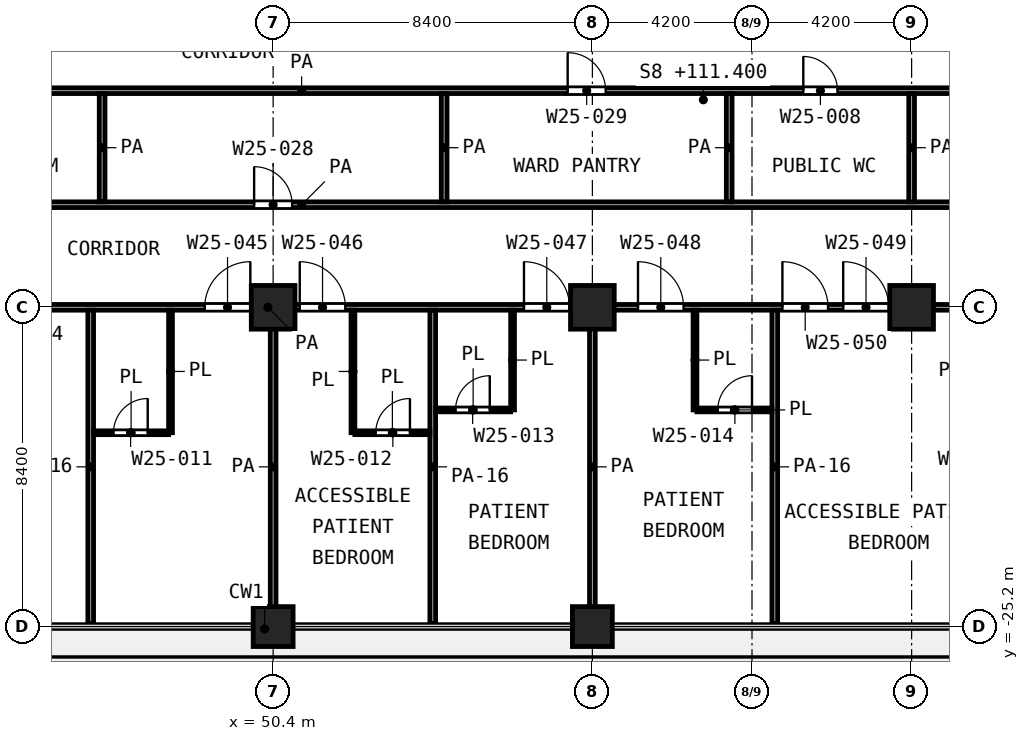
"""IFC4 building model, lengths in metres.
Left out: names, types, materials, properties, quantities, classifications, styles, units other than length and angle.
Written with IfcOpenShell. Run it as: python <this file> out.ifc"""

import sys

from ifc_helpers import new_model, si_unit, direction, frame, frame_2d, origin, origin_2d, place, context, subcontext, project, spatial, rectangle, extrude, element, fill, save


model = new_model("IFC4")
c1 = context("Model", 3, precision=1e-05, world=origin(), true_north=direction((0.0, 1.0)))
c2 = subcontext(c1, "Body", "Model", "MODEL_VIEW")
j1 = project(units=[si_unit("LENGTHUNIT", "METRE"), si_unit("PLANEANGLEUNIT", "RADIAN")], contexts=[c1])
p1 = place(None, origin())
s1 = spatial("IfcSite", under=j1, at=p1, CompositionType="ELEMENT")
p2 = place(p1, origin())
s2 = spatial("IfcBuilding", under=s1, at=p2, CompositionType="ELEMENT")
p3 = place(p2, frame((0.0, 0.0, 111.4)))
s3 = spatial("IfcBuildingStorey", under=s2, at=p3, CompositionType="ELEMENT", Elevation=111.4)
for number, where, z_axis, x_axis in (
    (1, (50.4, -16.8, 0.0), (0.0, 0.0, 1.0), (1.0, 0.0, 0.0)),
    (2, (58.8, -16.8, 0.0), (0.0, 0.0, 1.0), (1.0, 0.0, 0.0)),
    (3, (67.2, -16.8, 0.0), (0.0, 0.0, 1.0), (1.0, 0.0, 0.0)),
):
    element("IfcColumn", number, at=place(p3, frame(where, z_axis=z_axis, x_axis=x_axis)), inside=s3, PredefinedType="COLUMN", context=c2, shape_type="SweptSolid", body=[
        extrude(rectangle(XDim=1.15, YDim=1.15, at=origin_2d()), origin(), (0.0, 0.0, 1.0), 4.2),
    ])
for number, where, z_axis, x_axis in (
    (4, (50.4, -25.2, 0.0), (0.0, 0.0, 1.0), (1.0, 0.0, 0.0)),
    (5, (58.8, -25.2, 0.0), (0.0, 0.0, 1.0), (1.0, 0.0, 0.0)),
):
    element("IfcColumn", number, at=place(p3, frame(where, z_axis=z_axis, x_axis=x_axis)), inside=s3, PredefinedType="COLUMN", context=c2, shape_type="SweptSolid", body=[
        extrude(rectangle(XDim=1.05, YDim=1.05, at=origin_2d()), origin(), (0.0, 0.0, 1.0), 4.2),
    ])
p4 = place(p3, frame((45.675, -20.1, 0.0), z_axis=(0.0, 0.0, 1.0), x_axis=(1.0, 0.0, 0.0)))
e6 = element("IfcWall", 6, at=p4, inside=s3, PredefinedType="PARTITIONING", context=c2, shape_type="SweptSolid", body=[
    extrude(rectangle(XDim=1.975, YDim=0.1, at=frame_2d((0.987, 0.0))), origin(), (0.0, 0.0, 1.0), 3.6),
])
p5 = place(p4, frame((0.525, 0.0, 0.0)))
e7 = element("IfcOpeningElement", 7, at=p5, cuts=e6, PredefinedType="OPENING", context=c2, shape_type="SweptSolid", body=[
    extrude(rectangle(XDim=0.9, YDim=2.1, at=frame_2d((0.45, 1.05))), frame((0.0, 0.06, 0.0), z_axis=(0.0, -1.0, 0.0), x_axis=(1.0, 0.0, 0.0)), (0.0, 0.0, 1.0), 0.12),
])
p6 = place(p3, frame((52.55, -20.1, 0.0), z_axis=(0.0, 0.0, 1.0), x_axis=(1.0, 0.0, 0.0)))
e8 = element("IfcWall", 8, at=p6, inside=s3, PredefinedType="PARTITIONING", context=c2, shape_type="SweptSolid", body=[
    extrude(rectangle(XDim=1.975, YDim=0.1, at=frame_2d((0.987, 0.0))), origin(), (0.0, 0.0, 1.0), 3.6),
])
p7 = place(p6, frame((0.55, 0.0, 0.0)))
e9 = element("IfcOpeningElement", 9, at=p7, cuts=e8, PredefinedType="OPENING", context=c2, shape_type="SweptSolid", body=[
    extrude(rectangle(XDim=0.9, YDim=2.1, at=frame_2d((0.45, 1.05))), frame((0.0, 0.06, 0.0), z_axis=(0.0, -1.0, 0.0), x_axis=(1.0, 0.0, 0.0)), (0.0, 0.0, 1.0), 0.12),
])
p8 = place(p3, frame((54.675, -19.5, 0.0), z_axis=(0.0, 0.0, 1.0), x_axis=(1.0, 0.0, 0.0)))
e10 = element("IfcWall", 10, at=p8, inside=s3, PredefinedType="PARTITIONING", context=c2, shape_type="SweptSolid", body=[
    extrude(rectangle(XDim=1.975, YDim=0.1, at=frame_2d((0.987, 0.0))), origin(), (0.0, 0.0, 1.0), 3.6),
])
p9 = place(p8, frame((0.525, 0.0, 0.0)))
e11 = element("IfcOpeningElement", 11, at=p9, cuts=e10, PredefinedType="OPENING", context=c2, shape_type="SweptSolid", body=[
    extrude(rectangle(XDim=0.9, YDim=2.1, at=frame_2d((0.45, 1.05))), frame((0.0, 0.06, 0.0), z_axis=(0.0, -1.0, 0.0), x_axis=(1.0, 0.0, 0.0)), (0.0, 0.0, 1.0), 0.12),
])
p10 = place(p3, frame((61.55, -19.5, 0.0), z_axis=(0.0, 0.0, 1.0), x_axis=(1.0, 0.0, 0.0)))
e12 = element("IfcWall", 12, at=p10, inside=s3, PredefinedType="PARTITIONING", context=c2, shape_type="SweptSolid", body=[
    extrude(rectangle(XDim=1.975, YDim=0.1, at=frame_2d((0.987, 0.0))), origin(), (0.0, 0.0, 1.0), 3.6),
])
p11 = place(p10, frame((0.55, 0.0, 0.0)))
e13 = element("IfcOpeningElement", 13, at=p11, cuts=e12, PredefinedType="OPENING", context=c2, shape_type="SweptSolid", body=[
    extrude(rectangle(XDim=0.9, YDim=2.1, at=frame_2d((0.45, 1.05))), frame((0.0, 0.06, 0.0), z_axis=(0.0, -1.0, 0.0), x_axis=(1.0, 0.0, 0.0)), (0.0, 0.0, 1.0), 0.12),
])
for number, where, z_axis, x_axis in (
    (14, (47.7, -20.1, 0.0), (0.0, 0.0, 1.0), (0.0, 1.0, 0.0)),
    (15, (52.5, -20.1, 0.0), (0.0, 0.0, 1.0), (0.0, 1.0, 0.0)),
):
    element("IfcWall", number, at=place(p3, frame(where, z_axis=z_axis, x_axis=x_axis)), inside=s3, PredefinedType="PARTITIONING", context=c2, shape_type="SweptSolid", body=[
        extrude(rectangle(XDim=3.225, YDim=0.1, at=frame_2d((1.613, 0.0))), origin(), (0.0, 0.0, 1.0), 3.6),
    ])
for number, where, z_axis, x_axis in (
    (16, (56.7, -19.5, 0.0), (0.0, 0.0, 1.0), (0.0, 1.0, 0.0)),
    (17, (61.5, -19.5, 0.0), (0.0, 0.0, 1.0), (0.0, 1.0, 0.0)),
):
    element("IfcWall", number, at=place(p3, frame(where, z_axis=z_axis, x_axis=x_axis)), inside=s3, PredefinedType="PARTITIONING", context=c2, shape_type="SweptSolid", body=[
        extrude(rectangle(XDim=2.625, YDim=0.1, at=frame_2d((1.312, 0.0))), origin(), (0.0, 0.0, 1.0), 3.6),
    ])
p12 = place(p3, frame((25.0, -16.8, 0.0), z_axis=(0.0, 0.0, 1.0), x_axis=(1.0, 0.0, 0.0)))
e18 = element("IfcWall", 18, at=p12, inside=s3, PredefinedType="PARTITIONING", context=c2, shape_type="SweptSolid", body=[
    extrude(rectangle(XDim=50.52, YDim=0.15, at=frame_2d((25.26, 0.0))), origin(), (0.0, 0.0, 1.0), 3.6),
])
p13 = place(p12, frame((1.55, 0.0, 0.0)))
e19 = element("IfcOpeningElement", 19, at=p13, cuts=e18, PredefinedType="OPENING", context=c2, shape_type="SweptSolid", body=[
    extrude(rectangle(XDim=1.5, YDim=2.1, at=frame_2d((0.75, 1.05))), frame((0.0, 0.085, 0.0), z_axis=(0.0, -1.0, 0.0), x_axis=(1.0, 0.0, 0.0)), (0.0, 0.0, 1.0), 0.17),
])
p14 = place(p12, frame((6.0, 0.0, 0.0)))
e20 = element("IfcOpeningElement", 20, at=p14, cuts=e18, PredefinedType="OPENING", context=c2, shape_type="SweptSolid", body=[
    extrude(rectangle(XDim=1.0, YDim=2.1, at=frame_2d((0.5, 1.05))), frame((0.0, 0.085, 0.0), z_axis=(0.0, -1.0, 0.0), x_axis=(1.0, 0.0, 0.0)), (0.0, 0.0, 1.0), 0.17),
])
p15 = place(p12, frame((9.6, 0.0, 0.0)))
e21 = element("IfcOpeningElement", 21, at=p15, cuts=e18, PredefinedType="OPENING", context=c2, shape_type="SweptSolid", body=[
    extrude(rectangle(XDim=1.2, YDim=2.1, at=frame_2d((0.6, 1.05))), frame((0.0, 0.085, 0.0), z_axis=(0.0, -1.0, 0.0), x_axis=(1.0, 0.0, 0.0)), (0.0, 0.0, 1.0), 0.17),
])
p16 = place(p12, frame((18.2, 0.0, 0.0)))
e22 = element("IfcOpeningElement", 22, at=p16, cuts=e18, PredefinedType="OPENING", context=c2, shape_type="SweptSolid", body=[
    extrude(rectangle(XDim=1.2, YDim=2.1, at=frame_2d((0.6, 1.05))), frame((0.0, 0.085, 0.0), z_axis=(0.0, -1.0, 0.0), x_axis=(1.0, 0.0, 0.0)), (0.0, 0.0, 1.0), 0.17),
])
p17 = place(p12, frame((15.45, 0.0, 0.0)))
e23 = element("IfcOpeningElement", 23, at=p17, cuts=e18, PredefinedType="OPENING", context=c2, shape_type="SweptSolid", body=[
    extrude(rectangle(XDim=0.9, YDim=2.1, at=frame_2d((0.45, 1.05))), frame((0.0, 0.085, 0.0), z_axis=(0.0, -1.0, 0.0), x_axis=(1.0, 0.0, 0.0)), (0.0, 0.0, 1.0), 0.17),
])
p18 = place(p12, frame((23.6, 0.0, 0.0)))
e24 = element("IfcOpeningElement", 24, at=p18, cuts=e18, PredefinedType="OPENING", context=c2, shape_type="SweptSolid", body=[
    extrude(rectangle(XDim=1.2, YDim=2.1, at=frame_2d((0.6, 1.05))), frame((0.0, 0.085, 0.0), z_axis=(0.0, -1.0, 0.0), x_axis=(1.0, 0.0, 0.0)), (0.0, 0.0, 1.0), 0.17),
])
p19 = place(p12, frame((26.1, 0.0, 0.0)))
e25 = element("IfcOpeningElement", 25, at=p19, cuts=e18, PredefinedType="OPENING", context=c2, shape_type="SweptSolid", body=[
    extrude(rectangle(XDim=1.2, YDim=2.1, at=frame_2d((0.6, 1.05))), frame((0.0, 0.085, 0.0), z_axis=(0.0, -1.0, 0.0), x_axis=(1.0, 0.0, 0.0)), (0.0, 0.0, 1.0), 0.17),
])
p20 = place(p12, frame((32.0, 0.0, 0.0)))
e26 = element("IfcOpeningElement", 26, at=p20, cuts=e18, PredefinedType="OPENING", context=c2, shape_type="SweptSolid", body=[
    extrude(rectangle(XDim=1.2, YDim=2.1, at=frame_2d((0.6, 1.05))), frame((0.0, 0.085, 0.0), z_axis=(0.0, -1.0, 0.0), x_axis=(1.0, 0.0, 0.0)), (0.0, 0.0, 1.0), 0.17),
])
p21 = place(p12, frame((35.0, 0.0, 0.0)))
e27 = element("IfcOpeningElement", 27, at=p21, cuts=e18, PredefinedType="OPENING", context=c2, shape_type="SweptSolid", body=[
    extrude(rectangle(XDim=1.2, YDim=2.1, at=frame_2d((0.6, 1.05))), frame((0.0, 0.085, 0.0), z_axis=(0.0, -1.0, 0.0), x_axis=(1.0, 0.0, 0.0)), (0.0, 0.0, 1.0), 0.17),
])
p22 = place(p12, frame((40.4, 0.0, 0.0)))
e28 = element("IfcOpeningElement", 28, at=p22, cuts=e18, PredefinedType="OPENING", context=c2, shape_type="SweptSolid", body=[
    extrude(rectangle(XDim=1.2, YDim=2.1, at=frame_2d((0.6, 1.05))), frame((0.0, 0.085, 0.0), z_axis=(0.0, -1.0, 0.0), x_axis=(1.0, 0.0, 0.0)), (0.0, 0.0, 1.0), 0.17),
])
p23 = place(p12, frame((38.8, 0.0, 0.0)))
e29 = element("IfcOpeningElement", 29, at=p23, cuts=e18, PredefinedType="OPENING", context=c2, shape_type="SweptSolid", body=[
    extrude(rectangle(XDim=1.2, YDim=2.1, at=frame_2d((0.6, 1.05))), frame((0.0, 0.085, 0.0), z_axis=(0.0, -1.0, 0.0), x_axis=(1.0, 0.0, 0.0)), (0.0, 0.0, 1.0), 0.17),
])
p24 = place(p12, frame((47.85, 0.0, 0.0)))
e30 = element("IfcOpeningElement", 30, at=p24, cuts=e18, PredefinedType="OPENING", context=c2, shape_type="SweptSolid", body=[
    extrude(rectangle(XDim=1.0, YDim=2.1, at=frame_2d((0.5, 1.05))), frame((0.0, 0.085, 0.0), z_axis=(0.0, -1.0, 0.0), x_axis=(1.0, 0.0, 0.0)), (0.0, 0.0, 1.0), 0.17),
])
p25 = place(p3, frame((29.475, -14.1, 0.0), z_axis=(0.0, 0.0, 1.0), x_axis=(1.0, 0.0, 0.0)))
e31 = element("IfcWall", 31, at=p25, inside=s3, PredefinedType="PARTITIONING", context=c2, shape_type="SweptSolid", body=[
    extrude(rectangle(XDim=43.35, YDim=0.15, at=frame_2d((21.675, 0.0))), origin(), (0.0, 0.0, 1.0), 3.6),
])
p26 = place(p25, frame((20.425, 0.0, 0.0)))
e32 = element("IfcOpeningElement", 32, at=p26, cuts=e31, PredefinedType="OPENING", context=c2, shape_type="SweptSolid", body=[
    extrude(rectangle(XDim=1.0, YDim=2.1, at=frame_2d((0.5, 1.05))), frame((0.0, 0.085, 0.0), z_axis=(0.0, -1.0, 0.0), x_axis=(1.0, 0.0, 0.0)), (0.0, 0.0, 1.0), 0.17),
])
p27 = place(p3, frame((29.475, -11.1, 0.0), z_axis=(0.0, 0.0, 1.0), x_axis=(1.0, 0.0, 0.0)))
e33 = element("IfcWall", 33, at=p27, inside=s3, PredefinedType="PARTITIONING", context=c2, shape_type="SweptSolid", body=[
    extrude(rectangle(XDim=43.35, YDim=0.15, at=frame_2d((21.675, 0.0))), origin(), (0.0, 0.0, 1.0), 3.6),
])
p28 = place(p27, frame((28.675, 0.0, 0.0)))
e34 = element("IfcOpeningElement", 34, at=p28, cuts=e33, PredefinedType="OPENING", context=c2, shape_type="SweptSolid", body=[
    extrude(rectangle(XDim=1.0, YDim=2.1, at=frame_2d((0.5, 1.05))), frame((0.0, 0.085, 0.0), z_axis=(0.0, -1.0, 0.0), x_axis=(1.0, 0.0, 0.0)), (0.0, 0.0, 1.0), 0.17),
])
p29 = place(p27, frame((34.875, 0.0, 0.0)))
e35 = element("IfcOpeningElement", 35, at=p29, cuts=e33, PredefinedType="OPENING", context=c2, shape_type="SweptSolid", body=[
    extrude(rectangle(XDim=0.9, YDim=2.1, at=frame_2d((0.45, 1.05))), frame((0.0, 0.085, 0.0), z_axis=(0.0, -1.0, 0.0), x_axis=(1.0, 0.0, 0.0)), (0.0, 0.0, 1.0), 0.17),
])
p30 = place(p27, frame((40.075, 0.0, 0.0)))
e36 = element("IfcOpeningElement", 36, at=p30, cuts=e33, PredefinedType="OPENING", context=c2, shape_type="SweptSolid", body=[
    extrude(rectangle(XDim=1.0, YDim=2.1, at=frame_2d((0.5, 1.05))), frame((0.0, 0.085, 0.0), z_axis=(0.0, -1.0, 0.0), x_axis=(1.0, 0.0, 0.0)), (0.0, 0.0, 1.0), 0.17),
])
p31 = place(p27, frame((5.475, 0.0, 0.0)))
e37 = element("IfcOpeningElement", 37, at=p31, cuts=e33, PredefinedType="OPENING", context=c2, shape_type="SweptSolid", body=[
    extrude(rectangle(XDim=1.0, YDim=2.1, at=frame_2d((0.5, 1.05))), frame((0.0, 0.085, 0.0), z_axis=(0.0, -1.0, 0.0), x_axis=(1.0, 0.0, 0.0)), (0.0, 0.0, 1.0), 0.17),
])
p32 = place(p27, frame((12.675, 0.0, 0.0)))
e38 = element("IfcOpeningElement", 38, at=p32, cuts=e33, PredefinedType="OPENING", context=c2, shape_type="SweptSolid", body=[
    extrude(rectangle(XDim=1.0, YDim=2.1, at=frame_2d((0.5, 1.05))), frame((0.0, 0.085, 0.0), z_axis=(0.0, -1.0, 0.0), x_axis=(1.0, 0.0, 0.0)), (0.0, 0.0, 1.0), 0.17),
])
p33 = place(p3, frame((45.6, -25.12, 0.0), z_axis=(0.0, 0.0, 1.0), x_axis=(0.0, 1.0, 0.0)))
e39 = element("IfcWall", 39, at=p33, inside=s3, PredefinedType="PARTITIONING", context=c2, shape_type="SweptSolid", body=[
    extrude(rectangle(XDim=8.245, YDim=0.15, at=frame_2d((4.123, 0.0))), origin(), (0.0, 0.0, 1.0), 2.7),
])
p34 = place(p3, frame((45.9, -14.025, 0.0), z_axis=(0.0, 0.0, 1.0), x_axis=(0.0, 1.0, 0.0)))
e40 = element("IfcWall", 40, at=p34, inside=s3, PredefinedType="PARTITIONING", context=c2, shape_type="SweptSolid", body=[
    extrude(rectangle(XDim=2.85, YDim=0.15, at=frame_2d((1.425, 0.0))), origin(), (0.0, 0.0, 1.0), 3.6),
])
p35 = place(p3, frame((50.4, -25.12, 0.0), z_axis=(0.0, 0.0, 1.0), x_axis=(0.0, 1.0, 0.0)))
e41 = element("IfcWall", 41, at=p35, inside=s3, PredefinedType="PARTITIONING", context=c2, shape_type="SweptSolid", body=[
    extrude(rectangle(XDim=8.245, YDim=0.15, at=frame_2d((4.123, 0.0))), origin(), (0.0, 0.0, 1.0), 3.6),
])
p36 = place(p3, frame((54.6, -25.12, 0.0), z_axis=(0.0, 0.0, 1.0), x_axis=(0.0, 1.0, 0.0)))
e42 = element("IfcWall", 42, at=p36, inside=s3, PredefinedType="PARTITIONING", context=c2, shape_type="SweptSolid", body=[
    extrude(rectangle(XDim=8.245, YDim=0.15, at=frame_2d((4.123, 0.0))), origin(), (0.0, 0.0, 1.0), 2.7),
])
p37 = place(p3, frame((54.9, -14.025, 0.0), z_axis=(0.0, 0.0, 1.0), x_axis=(0.0, 1.0, 0.0)))
e43 = element("IfcWall", 43, at=p37, inside=s3, PredefinedType="PARTITIONING", context=c2, shape_type="SweptSolid", body=[
    extrude(rectangle(XDim=2.85, YDim=0.15, at=frame_2d((1.425, 0.0))), origin(), (0.0, 0.0, 1.0), 3.6),
])
p38 = place(p3, frame((58.8, -25.12, 0.0), z_axis=(0.0, 0.0, 1.0), x_axis=(0.0, 1.0, 0.0)))
e44 = element("IfcWall", 44, at=p38, inside=s3, PredefinedType="PARTITIONING", context=c2, shape_type="SweptSolid", body=[
    extrude(rectangle(XDim=8.245, YDim=0.15, at=frame_2d((4.123, 0.0))), origin(), (0.0, 0.0, 1.0), 3.6),
])
p39 = place(p3, frame((62.4, -14.025, 0.0), z_axis=(0.0, 0.0, 1.0), x_axis=(0.0, 1.0, 0.0)))
e45 = element("IfcWall", 45, at=p39, inside=s3, PredefinedType="PARTITIONING", context=c2, shape_type="SweptSolid", body=[
    extrude(rectangle(XDim=2.85, YDim=0.15, at=frame_2d((1.425, 0.0))), origin(), (0.0, 0.0, 1.0), 3.6),
])
p40 = place(p3, frame((63.6, -25.12, 0.0), z_axis=(0.0, 0.0, 1.0), x_axis=(0.0, 1.0, 0.0)))
e46 = element("IfcWall", 46, at=p40, inside=s3, PredefinedType="PARTITIONING", context=c2, shape_type="SweptSolid", body=[
    extrude(rectangle(XDim=8.245, YDim=0.15, at=frame_2d((4.123, 0.0))), origin(), (0.0, 0.0, 1.0), 2.7),
])
p41 = place(p3, frame((67.2, -14.025, 0.0), z_axis=(0.0, 0.0, 1.0), x_axis=(0.0, 1.0, 0.0)))
e47 = element("IfcWall", 47, at=p41, inside=s3, PredefinedType="PARTITIONING", context=c2, shape_type="SweptSolid", body=[
    extrude(rectangle(XDim=2.85, YDim=0.15, at=frame_2d((1.425, 0.0))), origin(), (0.0, 0.0, 1.0), 3.6),
])
p42 = place(p26, origin())
e48 = element("IfcDoor", 48, at=p42, inside=s3, OperationType="SINGLE_SWING_LEFT", PredefinedType="DOOR", context=c2, shape_type="SweptSolid", body=[
    extrude(rectangle(XDim=1.0, YDim=2.1, at=frame_2d((0.5, 1.05))), frame((0.0, 0.025, 0.0), z_axis=(0.0, -1.0, 0.0), x_axis=(1.0, 0.0, 0.0)), (0.0, 0.0, 1.0), 0.05),
])
fill(e32, e48)
p43 = place(p28, origin())
e49 = element("IfcDoor", 49, at=p43, inside=s3, OperationType="SINGLE_SWING_LEFT", PredefinedType="DOOR", context=c2, shape_type="SweptSolid", body=[
    extrude(rectangle(XDim=1.0, YDim=2.1, at=frame_2d((0.5, 1.05))), frame((0.0, 0.025, 0.0), z_axis=(0.0, -1.0, 0.0), x_axis=(1.0, 0.0, 0.0)), (0.0, 0.0, 1.0), 0.05),
])
fill(e34, e49)
p44 = place(p29, origin())
e50 = element("IfcDoor", 50, at=p44, inside=s3, OperationType="SINGLE_SWING_LEFT", PredefinedType="DOOR", context=c2, shape_type="SweptSolid", body=[
    extrude(rectangle(XDim=0.9, YDim=2.1, at=frame_2d((0.45, 1.05))), frame((0.0, 0.025, 0.0), z_axis=(0.0, -1.0, 0.0), x_axis=(1.0, 0.0, 0.0)), (0.0, 0.0, 1.0), 0.05),
])
fill(e35, e50)
p45 = place(p18, origin())
e51 = element("IfcDoor", 51, at=p45, inside=s3, OperationType="SINGLE_SWING_RIGHT", PredefinedType="DOOR", context=c2, shape_type="SweptSolid", body=[
    extrude(rectangle(XDim=1.2, YDim=2.1, at=frame_2d((0.6, 1.05))), frame((0.0, 0.025, 0.0), z_axis=(0.0, -1.0, 0.0), x_axis=(1.0, 0.0, 0.0)), (0.0, 0.0, 1.0), 0.05),
])
fill(e24, e51)
p46 = place(p5, origin())
e52 = element("IfcDoor", 52, at=p46, inside=s3, OperationType="SINGLE_SWING_RIGHT", PredefinedType="DOOR", context=c2, shape_type="SweptSolid", body=[
    extrude(rectangle(XDim=0.9, YDim=2.1, at=frame_2d((0.45, 1.05))), frame((0.0, 0.025, 0.0), z_axis=(0.0, -1.0, 0.0), x_axis=(1.0, 0.0, 0.0)), (0.0, 0.0, 1.0), 0.05),
])
fill(e7, e52)
p47 = place(p19, origin())
e53 = element("IfcDoor", 53, at=p47, inside=s3, OperationType="SINGLE_SWING_LEFT", PredefinedType="DOOR", context=c2, shape_type="SweptSolid", body=[
    extrude(rectangle(XDim=1.2, YDim=2.1, at=frame_2d((0.6, 1.05))), frame((0.0, 0.025, 0.0), z_axis=(0.0, -1.0, 0.0), x_axis=(1.0, 0.0, 0.0)), (0.0, 0.0, 1.0), 0.05),
])
fill(e25, e53)
p48 = place(p7, origin())
e54 = element("IfcDoor", 54, at=p48, inside=s3, OperationType="SINGLE_SWING_RIGHT", PredefinedType="DOOR", context=c2, shape_type="SweptSolid", body=[
    extrude(rectangle(XDim=0.9, YDim=2.1, at=frame_2d((0.45, 1.05))), frame((0.0, 0.025, 0.0), z_axis=(0.0, -1.0, 0.0), x_axis=(1.0, 0.0, 0.0)), (0.0, 0.0, 1.0), 0.05),
])
fill(e9, e54)
p49 = place(p20, origin())
e55 = element("IfcDoor", 55, at=p49, inside=s3, OperationType="SINGLE_SWING_LEFT", PredefinedType="DOOR", context=c2, shape_type="SweptSolid", body=[
    extrude(rectangle(XDim=1.2, YDim=2.1, at=frame_2d((0.6, 1.05))), frame((0.0, 0.025, 0.0), z_axis=(0.0, -1.0, 0.0), x_axis=(1.0, 0.0, 0.0)), (0.0, 0.0, 1.0), 0.05),
])
fill(e26, e55)
p50 = place(p9, origin())
e56 = element("IfcDoor", 56, at=p50, inside=s3, OperationType="SINGLE_SWING_RIGHT", PredefinedType="DOOR", context=c2, shape_type="SweptSolid", body=[
    extrude(rectangle(XDim=0.9, YDim=2.1, at=frame_2d((0.45, 1.05))), frame((0.0, 0.025, 0.0), z_axis=(0.0, -1.0, 0.0), x_axis=(1.0, 0.0, 0.0)), (0.0, 0.0, 1.0), 0.05),
])
fill(e11, e56)
p51 = place(p21, origin())
e57 = element("IfcDoor", 57, at=p51, inside=s3, OperationType="SINGLE_SWING_LEFT", PredefinedType="DOOR", context=c2, shape_type="SweptSolid", body=[
    extrude(rectangle(XDim=1.2, YDim=2.1, at=frame_2d((0.6, 1.05))), frame((0.0, 0.025, 0.0), z_axis=(0.0, -1.0, 0.0), x_axis=(1.0, 0.0, 0.0)), (0.0, 0.0, 1.0), 0.05),
])
fill(e27, e57)
p52 = place(p11, origin())
e58 = element("IfcDoor", 58, at=p52, inside=s3, OperationType="SINGLE_SWING_RIGHT", PredefinedType="DOOR", context=c2, shape_type="SweptSolid", body=[
    extrude(rectangle(XDim=0.9, YDim=2.1, at=frame_2d((0.45, 1.05))), frame((0.0, 0.025, 0.0), z_axis=(0.0, -1.0, 0.0), x_axis=(1.0, 0.0, 0.0)), (0.0, 0.0, 1.0), 0.05),
])
fill(e13, e58)
p53 = place(p22, origin())
e59 = element("IfcDoor", 59, at=p53, inside=s3, OperationType="SINGLE_SWING_LEFT", PredefinedType="DOOR", context=c2, shape_type="SweptSolid", body=[
    extrude(rectangle(XDim=1.2, YDim=2.1, at=frame_2d((0.6, 1.05))), frame((0.0, 0.025, 0.0), z_axis=(0.0, -1.0, 0.0), x_axis=(1.0, 0.0, 0.0)), (0.0, 0.0, 1.0), 0.05),
])
fill(e28, e59)
p54 = place(p23, origin())
e60 = element("IfcDoor", 60, at=p54, inside=s3, OperationType="SINGLE_SWING_LEFT", PredefinedType="DOOR", context=c2, shape_type="SweptSolid", body=[
    extrude(rectangle(XDim=1.2, YDim=2.1, at=frame_2d((0.6, 1.05))), frame((0.0, 0.025, 0.0), z_axis=(0.0, -1.0, 0.0), x_axis=(1.0, 0.0, 0.0)), (0.0, 0.0, 1.0), 0.05),
])
fill(e29, e60)
save(model, sys.argv[1])
